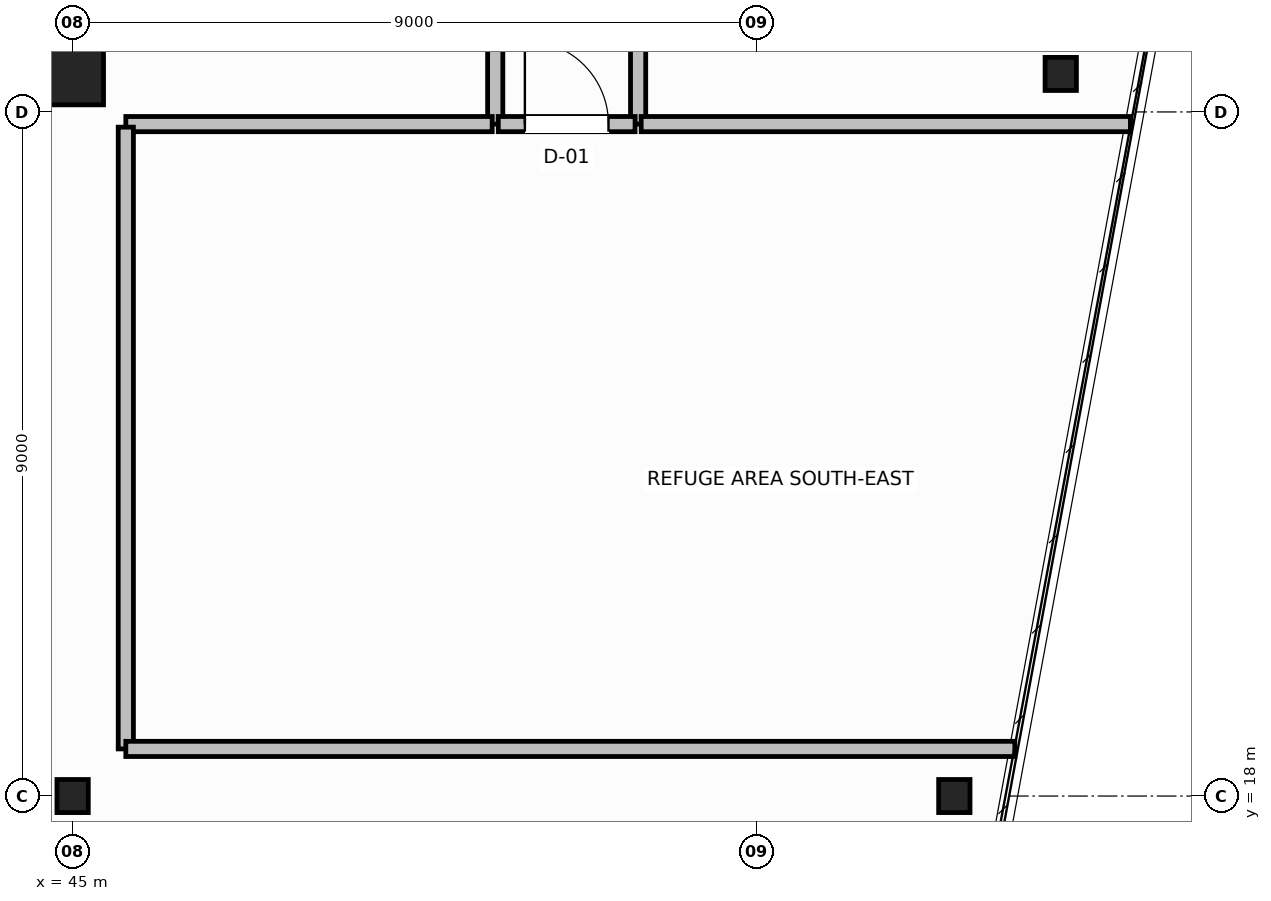
"""IFC4 building model, lengths in metres.
Left out: names, types, materials, properties, quantities, classifications, styles, units other than length and angle.
Written with IfcOpenShell. Run it as: python <this file> out.ifc"""

import sys

from ifc_helpers import new_model, si_unit, direction, frame, frame_2d, origin, origin_2d, place, context, subcontext, project, spatial, rectangle, hollow_circle, i_section, extrude, source, transform, mapped, element, fill, save


model = new_model("IFC4")
c1 = context("Model", 3, precision=1e-05, world=origin(), true_north=direction((0.0, 1.0)))
c2 = subcontext(c1, "Body", "Model", "MODEL_VIEW")
j1 = project(units=[si_unit("LENGTHUNIT", "METRE"), si_unit("PLANEANGLEUNIT", "RADIAN")], contexts=[c1])
p1 = place(None, origin())
s1 = spatial("IfcSite", under=j1, at=p1, CompositionType="ELEMENT")
p2 = place(p1, origin())
s2 = spatial("IfcBuilding", under=s1, at=p2, CompositionType="ELEMENT")
p3 = place(p2, frame((0.0, 0.0, 218.4)))
s3 = spatial("IfcBuildingStorey", under=s2, at=p3, CompositionType="ELEMENT", Elevation=218.4)
m1 = source(origin(), c2, "Body", "SweptSolid", [
    extrude(i_section(OverallWidth=0.412, OverallDepth=0.435, WebThickness=0.036, FlangeThickness=0.05, FilletRadius=0.015, at=origin_2d()), origin(), (0.0, 0.0, 1.0), 4.8),
])
for number, where, z_axis, x_axis in (
    (1, (58.0, 27.5, 0.0), (0.0, 0.0, 1.0), (1.0, 0.0, 0.0)),
    (2, (56.6, 18.0, 0.0), (0.0, 0.0, 1.0), (1.0, 0.0, 0.0)),
):
    element("IfcColumn", number, at=place(p3, frame(where, z_axis=z_axis, x_axis=x_axis)), inside=s3, PredefinedType="COLUMN", context=c2, shape_type="MappedRepresentation", body=[
        mapped(m1, transform((0.0, 0.0, 0.0), scale=1.0)),
    ])
m2 = source(origin(), c2, "Body", "SweptSolid", [
    extrude(hollow_circle(Radius=0.406, WallThickness=0.04, at=origin_2d()), origin(), (0.0, 0.0, 1.0), 4.8),
])
p4 = place(p3, frame((45.0, 27.5, 0.0), z_axis=(0.0, 0.0, 1.0), x_axis=(1.0, 0.0, 0.0)))
e3 = element("IfcColumn", 3, at=p4, inside=s3, PredefinedType="COLUMN", context=c2, shape_type="MappedRepresentation", body=[
    mapped(m2, transform((0.0, 0.0, 0.0), scale=1.0)),
])
m3 = source(origin(), c2, "Body", "SweptSolid", [
    extrude(i_section(OverallWidth=0.412, OverallDepth=0.435, WebThickness=0.036, FlangeThickness=0.05, FilletRadius=0.015, at=origin_2d()), origin(), (0.0, 0.0, 1.0), 4.8),
])
p5 = place(p3, frame((45.0, 18.0, 0.0), z_axis=(0.0, 0.0, 1.0), x_axis=(1.0, 0.0, 0.0)))
e4 = element("IfcColumn", 4, at=p5, inside=s3, PredefinedType="COLUMN", context=c2, shape_type="MappedRepresentation", body=[
    mapped(m3, transform((0.0, 0.0, 0.0), scale=1.0)),
])
p6 = place(p3, frame((50.56, 26.84, 0.0), z_axis=(0.0, 0.0, 1.0), x_axis=(0.0, 1.0, 0.0)))
e5 = element("IfcWall", 5, at=p6, inside=s3, PredefinedType="SOLIDWALL", context=c2, shape_type="SweptSolid", body=[
    extrude(rectangle(XDim=6.92, YDim=0.2, at=frame_2d((3.46, 0.0))), origin(), (0.0, 0.0, 1.0), 4.54),
])
p7 = place(p6, frame((3.0, 0.0, 0.0)))
e6 = element("IfcOpeningElement", 6, at=p7, cuts=e5, PredefinedType="OPENING", context=c2, shape_type="SweptSolid", body=[
    extrude(rectangle(XDim=1.1, YDim=2.15, at=frame_2d((0.55, 1.075))), frame((0.0, 0.11, 0.0), z_axis=(0.0, -1.0, 0.0), x_axis=(1.0, 0.0, 0.0)), (0.0, 0.0, 1.0), 0.22),
])
p8 = place(p3, frame((52.44, 26.84, 0.0), z_axis=(0.0, 0.0, 1.0), x_axis=(0.0, 1.0, 0.0)))
e7 = element("IfcWall", 7, at=p8, inside=s3, PredefinedType="SOLIDWALL", context=c2, shape_type="SweptSolid", body=[
    extrude(rectangle(XDim=6.92, YDim=0.2, at=frame_2d((3.46, 0.0))), origin(), (0.0, 0.0, 1.0), 4.54),
])
p9 = place(p3, frame((50.6, 26.84, 0.0), z_axis=(0.0, 0.0, 1.0), x_axis=(1.0, 0.0, 0.0)))
e8 = element("IfcWall", 8, at=p9, inside=s3, PredefinedType="SOLIDWALL", context=c2, shape_type="SweptSolid", body=[
    extrude(rectangle(XDim=1.8, YDim=0.2, at=frame_2d((0.9, 0.0))), origin(), (0.0, 0.0, 1.0), 4.54),
])
p10 = place(p9, frame((0.35, 0.0, 0.0)))
e9 = element("IfcOpeningElement", 9, at=p10, cuts=e8, PredefinedType="OPENING", context=c2, shape_type="SweptSolid", body=[
    extrude(rectangle(XDim=1.1, YDim=2.15, at=frame_2d((0.55, 1.075))), frame((0.0, 0.11, 0.0), z_axis=(0.0, -1.0, 0.0), x_axis=(1.0, 0.0, 0.0)), (0.0, 0.0, 1.0), 0.22),
])
p11 = place(p3, frame((45.7, 26.84, 0.0), z_axis=(0.0, 0.0, 1.0), x_axis=(1.0, 0.0, 0.0)))
e10 = element("IfcWall", 10, at=p11, inside=s3, PredefinedType="SOLIDWALL", context=c2, shape_type="SweptSolid", body=[
    extrude(rectangle(XDim=4.82, YDim=0.2, at=frame_2d((2.41, 0.0))), origin(), (0.0, 0.0, 1.0), 4.54),
])
p12 = place(p3, frame((52.48, 26.84, 0.0), z_axis=(0.0, 0.0, 1.0), x_axis=(1.0, 0.0, 0.0)))
e11 = element("IfcWall", 11, at=p12, inside=s3, PredefinedType="SOLIDWALL", context=c2, shape_type="SweptSolid", body=[
    extrude(rectangle(XDim=6.437, YDim=0.2, at=frame_2d((3.218, 0.0))), origin(), (0.0, 0.0, 1.0), 4.54),
])
p13 = place(p3, frame((45.7, 18.62, 0.0), z_axis=(0.0, 0.0, 1.0), x_axis=(0.0, 1.0, 0.0)))
e12 = element("IfcWall", 12, at=p13, inside=s3, PredefinedType="SOLIDWALL", context=c2, shape_type="SweptSolid", body=[
    extrude(rectangle(XDim=8.18, YDim=0.2, at=frame_2d((4.09, 0.0))), origin(), (0.0, 0.0, 1.0), 4.54),
])
p14 = place(p3, frame((45.7, 18.62, 0.0), z_axis=(0.0, 0.0, 1.0), x_axis=(1.0, 0.0, 0.0)))
e13 = element("IfcWall", 13, at=p14, inside=s3, PredefinedType="SOLIDWALL", context=c2, shape_type="SweptSolid", body=[
    extrude(rectangle(XDim=11.696, YDim=0.2, at=frame_2d((5.848, 0.0))), origin(), (0.0, 0.0, 1.0), 4.54),
])
m4 = source(origin(), c2, "Body", "SweptSolid", [
    extrude(rectangle(XDim=1.1, YDim=2.15, at=frame_2d((0.55, 1.075))), frame((0.0, 0.025, 0.0), z_axis=(0.0, -1.0, 0.0), x_axis=(1.0, 0.0, 0.0)), (0.0, 0.0, 1.0), 0.05),
])
p15 = place(p10, origin())
e14 = element("IfcDoor", 14, at=p15, inside=s3, OperationType="SINGLE_SWING_RIGHT", PredefinedType="DOOR", context=c2, shape_type="MappedRepresentation", body=[
    mapped(m4, transform((0.0, 0.0, 0.0), scale=1.0)),
])
fill(e9, e14)
save(model, sys.argv[1])
